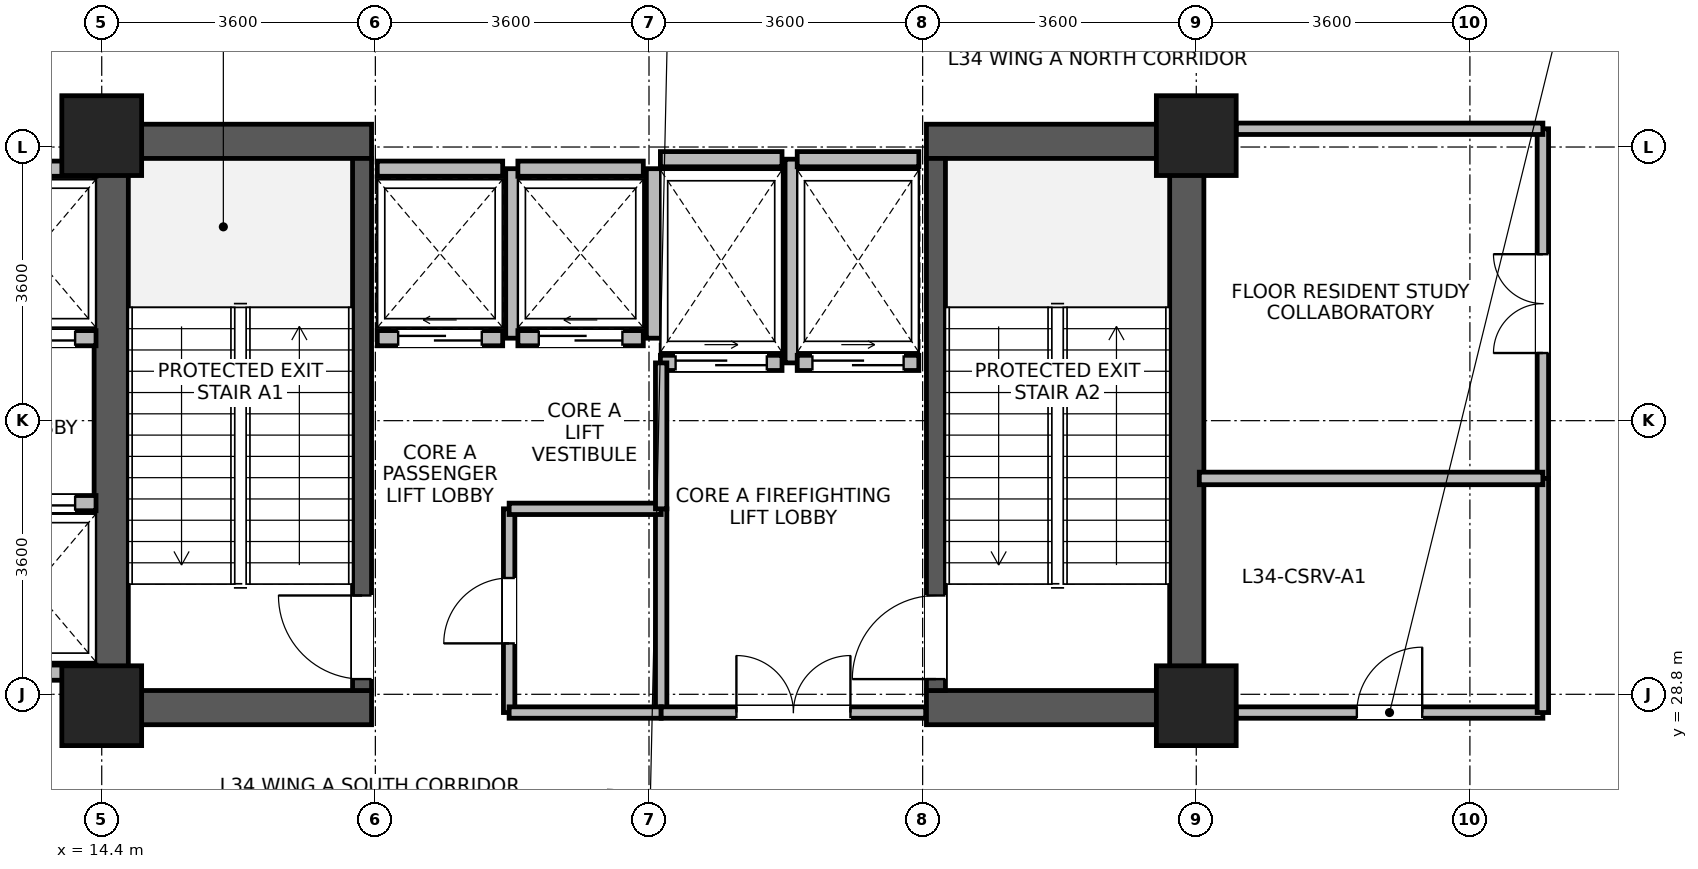
"""IFC4 building model, lengths in metres.
Left out: names, types, materials, properties, quantities, classifications, styles, units other than length and angle.
Written with IfcOpenShell. Run it as: python <this file> out.ifc"""

import sys

from ifc_helpers import new_model, si_unit, direction, frame, frame_2d, origin, origin_2d, place, context, subcontext, project, spatial, rectangle, extrude, source, transform, mapped, element, fill, save


model = new_model("IFC4")
c1 = context("Model", 3, precision=1e-05, world=origin(), true_north=direction((0.0, 1.0)))
c2 = subcontext(c1, "Body", "Model", "MODEL_VIEW")
j1 = project(units=[si_unit("LENGTHUNIT", "METRE"), si_unit("PLANEANGLEUNIT", "RADIAN")], contexts=[c1])
p1 = place(None, origin())
s1 = spatial("IfcSite", under=j1, at=p1, CompositionType="ELEMENT")
p2 = place(p1, origin())
s2 = spatial("IfcBuilding", under=s1, at=p2, CompositionType="ELEMENT")
p3 = place(p2, frame((0.0, 0.0, 135.6)))
s3 = spatial("IfcBuildingStorey", under=s2, at=p3, CompositionType="ELEMENT", Elevation=135.6)
for number, where, z_axis, x_axis in (
    (1, (14.525, 28.4, 0.0), (0.0, 0.0, 1.0), (0.0, 1.0, 0.0)),
    (2, (28.675, 28.4, 0.0), (0.0, 0.0, 1.0), (0.0, 1.0, 0.0)),
):
    element("IfcWall", number, at=place(p3, frame(where, z_axis=z_axis, x_axis=x_axis)), inside=s3, PredefinedType="SHEAR", context=c2, shape_type="SweptSolid", body=[
        extrude(rectangle(XDim=7.9, YDim=0.45, at=frame_2d((3.95, 0.0))), origin(), (0.0, 0.0, 1.0), 4.36),
    ])
for number, where, z_axis, x_axis in (
    (3, (14.75, 28.625, 0.0), (0.0, 0.0, 1.0), (1.0, 0.0, 0.0)),
    (4, (25.25, 28.625, 0.0), (0.0, 0.0, 1.0), (1.0, 0.0, 0.0)),
    (5, (14.75, 36.075, 0.0), (0.0, 0.0, 1.0), (1.0, 0.0, 0.0)),
    (6, (25.25, 36.075, 0.0), (0.0, 0.0, 1.0), (1.0, 0.0, 0.0)),
):
    element("IfcWall", number, at=place(p3, frame(where, z_axis=z_axis, x_axis=x_axis)), inside=s3, PredefinedType="SHEAR", context=c2, shape_type="SweptSolid", body=[
        extrude(rectangle(XDim=3.2, YDim=0.45, at=frame_2d((1.6, 0.0))), origin(), (0.0, 0.0, 1.0), 4.36),
    ])
p4 = place(p3, frame((17.825, 28.85, 0.0), z_axis=(0.0, 0.0, 1.0), x_axis=(0.0, 1.0, 0.0)))
e7 = element("IfcWall", 7, at=p4, inside=s3, PredefinedType="SHEAR", context=c2, shape_type="SweptSolid", body=[
    extrude(rectangle(XDim=7.0, YDim=0.25, at=frame_2d((3.5, 0.0))), origin(), (0.0, 0.0, 1.0), 4.36),
])
p5 = place(p4, frame((0.15, 0.0, 0.0)))
e8 = element("IfcOpeningElement", 8, at=p5, cuts=e7, PredefinedType="OPENING", context=c2, shape_type="SweptSolid", body=[
    extrude(rectangle(XDim=1.1, YDim=2.08, at=frame_2d((0.55, 1.04))), frame((0.0, 0.135, 0.0), z_axis=(0.0, -1.0, 0.0), x_axis=(1.0, 0.0, 0.0)), (0.0, 0.0, 1.0), 0.27),
])
p6 = place(p3, frame((25.375, 28.85, 0.0), z_axis=(0.0, 0.0, 1.0), x_axis=(0.0, 1.0, 0.0)))
e9 = element("IfcWall", 9, at=p6, inside=s3, PredefinedType="SHEAR", context=c2, shape_type="SweptSolid", body=[
    extrude(rectangle(XDim=7.0, YDim=0.25, at=frame_2d((3.5, 0.0))), origin(), (0.0, 0.0, 1.0), 4.36),
])
p7 = place(p6, frame((0.15, 0.0, 0.0)))
e10 = element("IfcOpeningElement", 10, at=p7, cuts=e9, PredefinedType="OPENING", context=c2, shape_type="SweptSolid", body=[
    extrude(rectangle(XDim=1.1, YDim=2.08, at=frame_2d((0.55, 1.04))), frame((0.0, 0.135, 0.0), z_axis=(0.0, -1.0, 0.0), x_axis=(1.0, 0.0, 0.0)), (0.0, 0.0, 1.0), 0.27),
])
m1 = source(origin(), c2, "Body", "SweptSolid", [
    extrude(rectangle(XDim=1.05, YDim=1.05, at=origin_2d()), origin(), (0.0, 0.0, 1.0), 4.6),
])
for number, where, z_axis, x_axis in (
    (11, (14.4, 28.65, 0.0), (0.0, 0.0, 1.0), (1.0, 0.0, 0.0)),
    (12, (14.4, 36.15, 0.0), (0.0, 0.0, 1.0), (1.0, 0.0, 0.0)),
    (13, (28.8, 28.65, 0.0), (0.0, 0.0, 1.0), (1.0, 0.0, 0.0)),
    (14, (28.8, 36.15, 0.0), (0.0, 0.0, 1.0), (1.0, 0.0, 0.0)),
):
    element("IfcColumn", number, at=place(p3, frame(where, z_axis=z_axis, x_axis=x_axis)), inside=s3, PredefinedType="COLUMN", context=c2, shape_type="MappedRepresentation", body=[
        mapped(m1, transform((0.0, 0.0, 0.0), x_axis=(1.0, 0.0, 0.0), y_axis=(0.0, 1.0, 0.0), z_axis=(0.0, 0.0, 1.0), scale=1.0)),
    ])
p8 = place(p3, frame((18.025, 33.485, 0.0), z_axis=(0.0, 0.0, 1.0), x_axis=(1.0, 0.0, 0.0)))
e15 = element("IfcWall", 15, at=p8, inside=s3, PredefinedType="PARTITIONING", context=c2, shape_type="SweptSolid", body=[
    extrude(rectangle(XDim=1.65, YDim=0.2, at=frame_2d((0.825, 0.0))), origin(), (0.0, 0.0, 1.0), 4.34),
])
p9 = place(p8, frame((0.275, 0.0, 0.0)))
e16 = element("IfcOpeningElement", 16, at=p9, cuts=e15, PredefinedType="OPENING", context=c2, shape_type="SweptSolid", body=[
    extrude(rectangle(XDim=1.1, YDim=2.12, at=frame_2d((0.55, 1.06))), frame((0.0, 0.11, 0.0), z_axis=(0.0, -1.0, 0.0), x_axis=(1.0, 0.0, 0.0)), (0.0, 0.0, 1.0), 0.22),
])
p10 = place(p3, frame((18.025, 35.715, 0.0), z_axis=(0.0, 0.0, 1.0), x_axis=(1.0, 0.0, 0.0)))
e17 = element("IfcWall", 17, at=p10, inside=s3, PredefinedType="PARTITIONING", context=c2, shape_type="SweptSolid", body=[
    extrude(rectangle(XDim=1.65, YDim=0.2, at=frame_2d((0.825, 0.0))), origin(), (0.0, 0.0, 1.0), 3.34),
])
p11 = place(p3, frame((19.815, 33.485, 0.0), z_axis=(0.0, 0.0, 1.0), x_axis=(0.0, 1.0, 0.0)))
e18 = element("IfcWall", 18, at=p11, inside=s3, PredefinedType="PARTITIONING", context=c2, shape_type="SweptSolid", body=[
    extrude(rectangle(XDim=2.23, YDim=0.2, at=frame_2d((1.115, 0.0))), origin(), (0.0, 0.0, 1.0), 4.34),
])
p12 = place(p3, frame((19.875, 33.485, 0.0), z_axis=(0.0, 0.0, 1.0), x_axis=(1.0, 0.0, 0.0)))
e19 = element("IfcWall", 19, at=p12, inside=s3, PredefinedType="PARTITIONING", context=c2, shape_type="SweptSolid", body=[
    extrude(rectangle(XDim=1.65, YDim=0.2, at=frame_2d((0.825, 0.0))), origin(), (0.0, 0.0, 1.0), 4.34),
])
p13 = place(p12, frame((0.275, 0.0, 0.0)))
e20 = element("IfcOpeningElement", 20, at=p13, cuts=e19, PredefinedType="OPENING", context=c2, shape_type="SweptSolid", body=[
    extrude(rectangle(XDim=1.1, YDim=2.12, at=frame_2d((0.55, 1.06))), frame((0.0, 0.11, 0.0), z_axis=(0.0, -1.0, 0.0), x_axis=(1.0, 0.0, 0.0)), (0.0, 0.0, 1.0), 0.22),
])
p14 = place(p3, frame((19.875, 35.715, 0.0), z_axis=(0.0, 0.0, 1.0), x_axis=(1.0, 0.0, 0.0)))
e21 = element("IfcWall", 21, at=p14, inside=s3, PredefinedType="PARTITIONING", context=c2, shape_type="SweptSolid", body=[
    extrude(rectangle(XDim=1.65, YDim=0.2, at=frame_2d((0.825, 0.0))), origin(), (0.0, 0.0, 1.0), 3.34),
])
p15 = place(p3, frame((21.665, 33.485, 0.0), z_axis=(0.0, 0.0, 1.0), x_axis=(0.0, 1.0, 0.0)))
e22 = element("IfcWall", 22, at=p15, inside=s3, PredefinedType="PARTITIONING", context=c2, shape_type="SweptSolid", body=[
    extrude(rectangle(XDim=2.23, YDim=0.2, at=frame_2d((1.115, 0.0))), origin(), (0.0, 0.0, 1.0), 4.34),
])
p16 = place(p3, frame((12.675, 33.485, 0.0), z_axis=(0.0, 0.0, 1.0), x_axis=(1.0, 0.0, 0.0)))
e23 = element("IfcWall", 23, at=p16, inside=s3, PredefinedType="PARTITIONING", context=c2, shape_type="SweptSolid", body=[
    extrude(rectangle(XDim=1.65, YDim=0.2, at=frame_2d((0.825, 0.0))), origin(), (0.0, 0.0, 1.0), 4.34),
])
p17 = place(p16, frame((0.275, 0.0, 0.0)))
e24 = element("IfcOpeningElement", 24, at=p17, cuts=e23, PredefinedType="OPENING", context=c2, shape_type="SweptSolid", body=[
    extrude(rectangle(XDim=1.1, YDim=2.12, at=frame_2d((0.55, 1.06))), frame((0.0, 0.11, 0.0), z_axis=(0.0, -1.0, 0.0), x_axis=(1.0, 0.0, 0.0)), (0.0, 0.0, 1.0), 0.22),
])
for number, where, z_axis, x_axis in (
    (25, (12.675, 35.715, 0.0), (0.0, 0.0, 1.0), (1.0, 0.0, 0.0)),
    (26, (12.675, 29.085, 0.0), (0.0, 0.0, 1.0), (1.0, 0.0, 0.0)),
):
    element("IfcWall", number, at=place(p3, frame(where, z_axis=z_axis, x_axis=x_axis)), inside=s3, PredefinedType="PARTITIONING", context=c2, shape_type="SweptSolid", body=[
        extrude(rectangle(XDim=1.65, YDim=0.2, at=frame_2d((0.825, 0.0))), origin(), (0.0, 0.0, 1.0), 4.34),
    ])
p18 = place(p3, frame((12.675, 31.315, 0.0), z_axis=(0.0, 0.0, 1.0), x_axis=(1.0, 0.0, 0.0)))
e27 = element("IfcWall", 27, at=p18, inside=s3, PredefinedType="PARTITIONING", context=c2, shape_type="SweptSolid", body=[
    extrude(rectangle(XDim=1.65, YDim=0.2, at=frame_2d((0.825, 0.0))), origin(), (0.0, 0.0, 1.0), 4.34),
])
p19 = place(p18, frame((0.275, 0.0, 0.0)))
e28 = element("IfcOpeningElement", 28, at=p19, cuts=e27, PredefinedType="OPENING", context=c2, shape_type="SweptSolid", body=[
    extrude(rectangle(XDim=1.1, YDim=2.12, at=frame_2d((0.55, 1.06))), frame((0.0, 0.11, 0.0), z_axis=(0.0, -1.0, 0.0), x_axis=(1.0, 0.0, 0.0)), (0.0, 0.0, 1.0), 0.22),
])
p20 = place(p3, frame((21.75, 33.16, 0.0), z_axis=(0.0, 0.0, 1.0), x_axis=(1.0, 0.0, 0.0)))
e29 = element("IfcWall", 29, at=p20, inside=s3, PredefinedType="PARTITIONING", context=c2, shape_type="SweptSolid", body=[
    extrude(rectangle(XDim=1.6, YDim=0.2, at=frame_2d((0.8, 0.0))), origin(), (0.0, 0.0, 1.0), 4.34),
])
p21 = place(p20, frame((0.2, 0.0, 0.0)))
e30 = element("IfcOpeningElement", 30, at=p21, cuts=e29, PredefinedType="OPENING", context=c2, shape_type="SweptSolid", body=[
    extrude(rectangle(XDim=1.2, YDim=2.12, at=frame_2d((0.6, 1.06))), frame((0.0, 0.11, 0.0), z_axis=(0.0, -1.0, 0.0), x_axis=(1.0, 0.0, 0.0)), (0.0, 0.0, 1.0), 0.22),
])
p22 = place(p3, frame((21.75, 35.84, 0.0), z_axis=(0.0, 0.0, 1.0), x_axis=(1.0, 0.0, 0.0)))
e31 = element("IfcWall", 31, at=p22, inside=s3, PredefinedType="PARTITIONING", context=c2, shape_type="SweptSolid", body=[
    extrude(rectangle(XDim=1.6, YDim=0.2, at=frame_2d((0.8, 0.0))), origin(), (0.0, 0.0, 1.0), 3.34),
])
p23 = place(p3, frame((23.49, 33.16, 0.0), z_axis=(0.0, 0.0, 1.0), x_axis=(0.0, 1.0, 0.0)))
e32 = element("IfcWall", 32, at=p23, inside=s3, PredefinedType="PARTITIONING", context=c2, shape_type="SweptSolid", body=[
    extrude(rectangle(XDim=2.68, YDim=0.2, at=frame_2d((1.34, 0.0))), origin(), (0.0, 0.0, 1.0), 4.34),
])
p24 = place(p3, frame((23.55, 33.16, 0.0), z_axis=(0.0, 0.0, 1.0), x_axis=(1.0, 0.0, 0.0)))
e33 = element("IfcWall", 33, at=p24, inside=s3, PredefinedType="PARTITIONING", context=c2, shape_type="SweptSolid", body=[
    extrude(rectangle(XDim=1.6, YDim=0.2, at=frame_2d((0.8, 0.0))), origin(), (0.0, 0.0, 1.0), 4.34),
])
p25 = place(p24, frame((0.2, 0.0, 0.0)))
e34 = element("IfcOpeningElement", 34, at=p25, cuts=e33, PredefinedType="OPENING", context=c2, shape_type="SweptSolid", body=[
    extrude(rectangle(XDim=1.2, YDim=2.12, at=frame_2d((0.6, 1.06))), frame((0.0, 0.11, 0.0), z_axis=(0.0, -1.0, 0.0), x_axis=(1.0, 0.0, 0.0)), (0.0, 0.0, 1.0), 0.22),
])
p26 = place(p3, frame((23.55, 35.84, 0.0), z_axis=(0.0, 0.0, 1.0), x_axis=(1.0, 0.0, 0.0)))
e35 = element("IfcWall", 35, at=p26, inside=s3, PredefinedType="PARTITIONING", context=c2, shape_type="SweptSolid", body=[
    extrude(rectangle(XDim=1.6, YDim=0.2, at=frame_2d((0.8, 0.0))), origin(), (0.0, 0.0, 1.0), 3.34),
])
p27 = place(p3, frame((33.36, 31.64, 0.0), z_axis=(0.0, 0.0, 1.0), x_axis=(0.0, 1.0, 0.0)))
e36 = element("IfcWall", 36, at=p27, inside=s3, PredefinedType="PARTITIONING", context=c2, shape_type="SweptSolid", body=[
    extrude(rectangle(XDim=4.6, YDim=0.15, at=frame_2d((2.3, 0.0))), origin(), (0.0, 0.0, 1.0), 4.34),
])
p28 = place(p27, frame((1.65, 0.0, 0.0)))
e37 = element("IfcOpeningElement", 37, at=p28, cuts=e36, PredefinedType="OPENING", context=c2, shape_type="SweptSolid", body=[
    extrude(rectangle(XDim=1.3, YDim=2.12, at=frame_2d((0.65, 1.06))), frame((0.0, 0.085, 0.0), z_axis=(0.0, -1.0, 0.0), x_axis=(1.0, 0.0, 0.0)), (0.0, 0.0, 1.0), 0.17),
])
p29 = place(p3, frame((29.325, 28.56, 0.0), z_axis=(0.0, 0.0, 1.0), x_axis=(1.0, 0.0, 0.0)))
e38 = element("IfcWall", 38, at=p29, inside=s3, PredefinedType="PARTITIONING", context=c2, shape_type="SweptSolid", body=[
    extrude(rectangle(XDim=4.035, YDim=0.15, at=frame_2d((2.018, 0.0))), origin(), (0.0, 0.0, 1.0), 3.74),
])
p30 = place(p29, frame((1.587, 0.0, 0.0)))
e39 = element("IfcOpeningElement", 39, at=p30, cuts=e38, PredefinedType="OPENING", context=c2, shape_type="SweptSolid", body=[
    extrude(rectangle(XDim=0.86, YDim=2.02, at=frame_2d((0.43, 1.01))), frame((0.0, 0.085, 0.0), z_axis=(0.0, -1.0, 0.0), x_axis=(1.0, 0.0, 0.0)), (0.0, 0.0, 1.0), 0.17),
])
p31 = place(p3, frame((29.325, 36.24, 0.0), z_axis=(0.0, 0.0, 1.0), x_axis=(1.0, 0.0, 0.0)))
e40 = element("IfcWall", 40, at=p31, inside=s3, PredefinedType="PARTITIONING", context=c2, shape_type="SweptSolid", body=[
    extrude(rectangle(XDim=4.035, YDim=0.15, at=frame_2d((2.018, 0.0))), origin(), (0.0, 0.0, 1.0), 3.74),
])
p32 = place(p3, frame((33.36, 28.56, 0.0), z_axis=(0.0, 0.0, 1.0), x_axis=(0.0, 1.0, 0.0)))
e41 = element("IfcWall", 41, at=p32, inside=s3, PredefinedType="PARTITIONING", context=c2, shape_type="SweptSolid", body=[
    extrude(rectangle(XDim=3.08, YDim=0.15, at=frame_2d((1.54, 0.0))), origin(), (0.0, 0.0, 1.0), 4.34),
])
p33 = place(p3, frame((19.76, 28.56, 0.0), z_axis=(0.0, 0.0, 1.0), x_axis=(0.0, 1.0, 0.0)))
e42 = element("IfcWall", 42, at=p33, inside=s3, PredefinedType="PARTITIONING", context=c2, shape_type="SweptSolid", body=[
    extrude(rectangle(XDim=2.68, YDim=0.15, at=frame_2d((1.34, 0.0))), origin(), (0.0, 0.0, 1.0), 4.34),
])
p34 = place(p33, frame((0.91, 0.0, 0.0)))
e43 = element("IfcOpeningElement", 43, at=p34, cuts=e42, PredefinedType="OPENING", context=c2, shape_type="SweptSolid", body=[
    extrude(rectangle(XDim=0.86, YDim=2.02, at=frame_2d((0.43, 1.01))), frame((0.0, 0.085, 0.0), z_axis=(0.0, -1.0, 0.0), x_axis=(1.0, 0.0, 0.0)), (0.0, 0.0, 1.0), 0.17),
])
p35 = place(p3, frame((21.76, 28.56, 0.0), z_axis=(0.0, 0.0, 1.0), x_axis=(0.0, 1.0, 0.0)))
e44 = element("IfcWall", 44, at=p35, inside=s3, PredefinedType="PARTITIONING", context=c2, shape_type="SweptSolid", body=[
    extrude(rectangle(XDim=2.68, YDim=0.15, at=frame_2d((1.34, 0.0))), origin(), (0.0, 0.0, 1.0), 4.34),
])
p36 = place(p3, frame((19.76, 28.56, 0.0), z_axis=(0.0, 0.0, 1.0), x_axis=(1.0, 0.0, 0.0)))
e45 = element("IfcWall", 45, at=p36, inside=s3, PredefinedType="PARTITIONING", context=c2, shape_type="SweptSolid", body=[
    extrude(rectangle(XDim=2.0, YDim=0.15, at=frame_2d((1.0, 0.0))), origin(), (0.0, 0.0, 1.0), 3.34),
])
p37 = place(p3, frame((19.76, 31.24, 0.0), z_axis=(0.0, 0.0, 1.0), x_axis=(1.0, 0.0, 0.0)))
e46 = element("IfcWall", 46, at=p37, inside=s3, PredefinedType="PARTITIONING", context=c2, shape_type="SweptSolid", body=[
    extrude(rectangle(XDim=2.0, YDim=0.15, at=frame_2d((1.0, 0.0))), origin(), (0.0, 0.0, 1.0), 4.34),
])
p38 = place(p3, frame((28.84, 31.64, 0.0), z_axis=(0.0, 0.0, 1.0), x_axis=(1.0, 0.0, 0.0)))
e47 = element("IfcWall", 47, at=p38, inside=s3, PredefinedType="PARTITIONING", context=c2, shape_type="SweptSolid", body=[
    extrude(rectangle(XDim=4.52, YDim=0.165, at=frame_2d((2.26, 0.0))), origin(), (0.0, 0.0, 1.0), 4.34),
])
p39 = place(p3, frame((21.76, 28.56, 0.0), z_axis=(0.0, 0.0, 1.0), x_axis=(1.0, 0.0, 0.0)))
e48 = element("IfcWall", 48, at=p39, inside=s3, PredefinedType="PARTITIONING", context=c2, shape_type="SweptSolid", body=[
    extrude(rectangle(XDim=3.48, YDim=0.15, at=frame_2d((1.74, 0.0))), origin(), (0.0, 0.0, 1.0), 3.34),
])
p40 = place(p39, frame((0.99, 0.0, 0.0)))
e49 = element("IfcOpeningElement", 49, at=p40, cuts=e48, PredefinedType="OPENING", context=c2, shape_type="SweptSolid", body=[
    extrude(rectangle(XDim=1.5, YDim=2.1, at=frame_2d((0.75, 1.05))), frame((0.0, 0.085, 0.0), z_axis=(0.0, -1.0, 0.0), x_axis=(1.0, 0.0, 0.0)), (0.0, 0.0, 1.0), 0.17),
])
p41 = place(p3, frame((21.76, 31.24, 0.0), z_axis=(0.0, 0.0, 1.0), x_axis=(0.0, 1.0, 0.0)))
e50 = element("IfcWall", 50, at=p41, inside=s3, PredefinedType="PARTITIONING", context=c2, shape_type="SweptSolid", body=[
    extrude(rectangle(XDim=1.92, YDim=0.15, at=frame_2d((0.96, 0.0))), origin(), (0.0, 0.0, 1.0), 4.34),
])
p42 = place(p5, origin())
e51 = element("IfcDoor", 51, at=p42, inside=s3, OperationType="SINGLE_SWING_RIGHT", PredefinedType="DOOR", context=c2, shape_type="SweptSolid", body=[
    extrude(rectangle(XDim=1.1, YDim=2.08, at=frame_2d((0.55, 1.04))), frame((0.0, 0.025, 0.0), z_axis=(0.0, -1.0, 0.0), x_axis=(1.0, 0.0, 0.0)), (0.0, 0.0, 1.0), 0.05),
])
fill(e8, e51)
p43 = place(p7, origin())
e52 = element("IfcDoor", 52, at=p43, inside=s3, OperationType="SINGLE_SWING_LEFT", PredefinedType="DOOR", context=c2, shape_type="SweptSolid", body=[
    extrude(rectangle(XDim=1.1, YDim=2.08, at=frame_2d((0.55, 1.04))), frame((0.0, 0.025, 0.0), z_axis=(0.0, -1.0, 0.0), x_axis=(1.0, 0.0, 0.0)), (0.0, 0.0, 1.0), 0.05),
])
fill(e10, e52)
p44 = place(p9, origin())
e53 = element("IfcDoor", 53, at=p44, inside=s3, OperationType="SLIDING_TO_LEFT", PredefinedType="DOOR", context=c2, shape_type="SweptSolid", body=[
    extrude(rectangle(XDim=1.1, YDim=2.12, at=frame_2d((0.55, 1.06))), frame((0.0, 0.025, 0.0), z_axis=(0.0, -1.0, 0.0), x_axis=(1.0, 0.0, 0.0)), (0.0, 0.0, 1.0), 0.05),
])
fill(e16, e53)
p45 = place(p13, origin())
e54 = element("IfcDoor", 54, at=p45, inside=s3, OperationType="SLIDING_TO_LEFT", PredefinedType="DOOR", context=c2, shape_type="SweptSolid", body=[
    extrude(rectangle(XDim=1.1, YDim=2.12, at=frame_2d((0.55, 1.06))), frame((0.0, 0.025, 0.0), z_axis=(0.0, -1.0, 0.0), x_axis=(1.0, 0.0, 0.0)), (0.0, 0.0, 1.0), 0.05),
])
fill(e20, e54)
p46 = place(p17, origin())
e55 = element("IfcDoor", 55, at=p46, inside=s3, OperationType="SLIDING_TO_LEFT", PredefinedType="DOOR", context=c2, shape_type="SweptSolid", body=[
    extrude(rectangle(XDim=1.1, YDim=2.12, at=frame_2d((0.55, 1.06))), frame((0.0, 0.025, 0.0), z_axis=(0.0, -1.0, 0.0), x_axis=(1.0, 0.0, 0.0)), (0.0, 0.0, 1.0), 0.05),
])
fill(e24, e55)
p47 = place(p19, origin())
e56 = element("IfcDoor", 56, at=p47, inside=s3, OperationType="SLIDING_TO_LEFT", PredefinedType="DOOR", context=c2, shape_type="SweptSolid", body=[
    extrude(rectangle(XDim=1.1, YDim=2.12, at=frame_2d((0.55, 1.06))), frame((0.0, 0.025, 0.0), z_axis=(0.0, -1.0, 0.0), x_axis=(1.0, 0.0, 0.0)), (0.0, 0.0, 1.0), 0.05),
])
fill(e28, e56)
p48 = place(p21, origin())
e57 = element("IfcDoor", 57, at=p48, inside=s3, OperationType="SLIDING_TO_RIGHT", PredefinedType="DOOR", context=c2, shape_type="SweptSolid", body=[
    extrude(rectangle(XDim=1.2, YDim=2.12, at=frame_2d((0.6, 1.06))), frame((0.0, 0.025, 0.0), z_axis=(0.0, -1.0, 0.0), x_axis=(1.0, 0.0, 0.0)), (0.0, 0.0, 1.0), 0.05),
])
fill(e30, e57)
p49 = place(p25, origin())
e58 = element("IfcDoor", 58, at=p49, inside=s3, OperationType="SLIDING_TO_RIGHT", PredefinedType="DOOR", context=c2, shape_type="SweptSolid", body=[
    extrude(rectangle(XDim=1.2, YDim=2.12, at=frame_2d((0.6, 1.06))), frame((0.0, 0.025, 0.0), z_axis=(0.0, -1.0, 0.0), x_axis=(1.0, 0.0, 0.0)), (0.0, 0.0, 1.0), 0.05),
])
fill(e34, e58)
p50 = place(p28, origin())
e59 = element("IfcDoor", 59, at=p50, inside=s3, OperationType="DOUBLE_DOOR_SINGLE_SWING", PredefinedType="DOOR", context=c2, shape_type="SweptSolid", body=[
    extrude(rectangle(XDim=1.3, YDim=2.12, at=frame_2d((0.65, 1.06))), frame((0.0, 0.025, 0.0), z_axis=(0.0, -1.0, 0.0), x_axis=(1.0, 0.0, 0.0)), (0.0, 0.0, 1.0), 0.05),
])
fill(e37, e59)
p51 = place(p30, origin())
e60 = element("IfcDoor", 60, at=p51, inside=s3, OperationType="SINGLE_SWING_RIGHT", PredefinedType="DOOR", context=c2, shape_type="SweptSolid", body=[
    extrude(rectangle(XDim=0.86, YDim=2.02, at=frame_2d((0.43, 1.01))), frame((0.0, 0.025, 0.0), z_axis=(0.0, -1.0, 0.0), x_axis=(1.0, 0.0, 0.0)), (0.0, 0.0, 1.0), 0.05),
])
fill(e39, e60)
p52 = place(p34, origin())
e61 = element("IfcDoor", 61, at=p52, inside=s3, OperationType="SINGLE_SWING_LEFT", PredefinedType="DOOR", context=c2, shape_type="SweptSolid", body=[
    extrude(rectangle(XDim=0.86, YDim=2.02, at=frame_2d((0.43, 1.01))), frame((0.0, 0.025, 0.0), z_axis=(0.0, -1.0, 0.0), x_axis=(1.0, 0.0, 0.0)), (0.0, 0.0, 1.0), 0.05),
])
fill(e43, e61)
p53 = place(p40, origin())
e62 = element("IfcDoor", 62, at=p53, inside=s3, OperationType="DOUBLE_DOOR_SINGLE_SWING", PredefinedType="DOOR", context=c2, shape_type="SweptSolid", body=[
    extrude(rectangle(XDim=1.5, YDim=2.1, at=frame_2d((0.75, 1.05))), frame((0.0, 0.025, 0.0), z_axis=(0.0, -1.0, 0.0), x_axis=(1.0, 0.0, 0.0)), (0.0, 0.0, 1.0), 0.05),
])
fill(e49, e62)
save(model, sys.argv[1])
